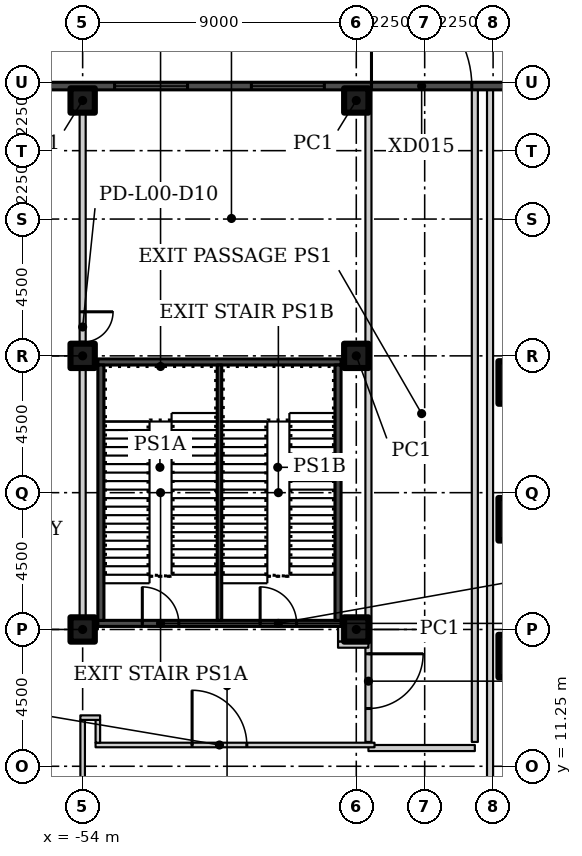
"""IFC4 building model, lengths in metres.
Left out: names, types, materials, properties, quantities, classifications, styles, units other than length and angle.
Written with IfcOpenShell. Run it as: python <this file> out.ifc"""

import sys

from ifc_helpers import new_model, si_unit, direction, frame, frame_2d, origin, origin_2d, place, context, subcontext, project, spatial, rectangle, hollow_rectangle, extrude, element, fill, save


model = new_model("IFC4")
c1 = context("Model", 3, precision=1e-05, world=origin(), true_north=direction((0.0, 1.0)))
c2 = subcontext(c1, "Body", "Model", "MODEL_VIEW")
j1 = project(units=[si_unit("LENGTHUNIT", "METRE"), si_unit("PLANEANGLEUNIT", "RADIAN")], contexts=[c1])
p1 = place(None, origin())
s1 = spatial("IfcSite", under=j1, at=p1, CompositionType="ELEMENT")
p2 = place(p1, origin())
s2 = spatial("IfcBuilding", under=s1, at=p2, CompositionType="ELEMENT")
p3 = place(p2, origin())
s3 = spatial("IfcBuildingStorey", under=s2, at=p3, CompositionType="ELEMENT", Elevation=0.0)
for number, where in (
    (1, (-39.625, 14.875, 0.0)),
    (2, (-39.625, 19.375, 0.0)),
    (3, (-39.625, 23.875, 0.0)),
):
    element("IfcColumn", number, at=place(p3, frame(where)), inside=s3, PredefinedType="COLUMN", context=c2, shape_type="SweptSolid", body=[
        extrude(hollow_rectangle(XDim=1.4, YDim=1.4, WallThickness=0.06, at=origin_2d()), origin(), (0.0, 0.0, 1.0), 6.1),
    ])
for number, where in (
    (4, (-54.0, 15.75, 0.0)),
    (5, (-54.0, 24.75, 0.0)),
    (6, (-54.0, 33.15, 0.0)),
    (7, (-45.0, 15.75, 0.0)),
    (8, (-45.0, 24.75, 0.0)),
    (9, (-45.0, 33.15, 0.0)),
):
    element("IfcColumn", number, at=place(p3, frame(where)), inside=s3, PredefinedType="COLUMN", context=c2, shape_type="SweptSolid", body=[
        extrude(hollow_rectangle(XDim=0.8, YDim=0.8, WallThickness=0.03, at=origin_2d()), origin(), (0.0, 0.0, 1.0), 6.1),
    ])
p4 = place(p3, frame((-40.6, 33.655, 0.0), z_axis=(0.0, 0.0, 1.0), x_axis=(0.0, -1.0, 0.0)))
e10 = element("IfcWall", 10, at=p4, inside=s3, PredefinedType="PARTITIONING", context=c2, shape_type="SweptSolid", body=[
    extrude(rectangle(XDim=26.905, YDim=0.2, at=frame_2d((13.453, 0.0))), origin(), (0.0, 0.0, 1.0), 6.1),
])
p5 = place(p3, frame((-44.6, 33.655, 0.0), z_axis=(0.0, 0.0, 1.0), x_axis=(0.0, -1.0, 0.0)))
e11 = element("IfcWall", 11, at=p5, inside=s3, PredefinedType="PARTITIONING", context=c2, shape_type="SweptSolid", body=[
    extrude(rectangle(XDim=21.605, YDim=0.2, at=frame_2d((10.802, 0.0))), origin(), (0.0, 0.0, 1.0), 6.1),
])
p6 = place(p5, frame((18.705, 0.0, 0.0)))
e12 = element("IfcOpeningElement", 12, at=p6, cuts=e11, PredefinedType="OPENING", context=c2, shape_type="SweptSolid", body=[
    extrude(rectangle(XDim=1.8, YDim=2.1, at=frame_2d((0.9, 1.05))), frame((0.0, 0.11, 0.0), z_axis=(0.0, -1.0, 0.0), x_axis=(1.0, 0.0, 0.0)), (0.0, 0.0, 1.0), 0.22),
])
p7 = place(p3, frame((-44.6, 11.85, 0.0)))
e13 = element("IfcWall", 13, at=p7, inside=s3, PredefinedType="PARTITIONING", context=c2, shape_type="SweptSolid", body=[
    extrude(rectangle(XDim=3.5, YDim=0.2, at=frame_2d((1.75, 0.0))), origin(), (0.0, 0.0, 1.0), 6.1),
])
p8 = place(p3, frame((-41.1, 12.05, 0.0), z_axis=(0.0, 0.0, 1.0), x_axis=(0.0, 1.0, 0.0)))
e14 = element("IfcWall", 14, at=p8, inside=s3, PredefinedType="PARTITIONING", context=c2, shape_type="SweptSolid", body=[
    extrude(rectangle(XDim=21.605, YDim=0.2, at=frame_2d((10.802, 0.0))), origin(), (0.0, 0.0, 1.0), 6.1),
])
p9 = place(p3, frame((-53.575, 11.95, 0.0)))
e15 = element("IfcWall", 15, at=p9, inside=s3, PredefinedType="PARTITIONING", context=c2, shape_type="SweptSolid", body=[
    extrude(rectangle(XDim=9.175, YDim=0.15, at=frame_2d((4.587, 0.0))), origin(), (0.0, 0.0, 1.0), 6.1),
])
p10 = place(p9, frame((3.175, 0.0, 0.0)))
e16 = element("IfcOpeningElement", 16, at=p10, cuts=e15, PredefinedType="OPENING", context=c2, shape_type="SweptSolid", body=[
    extrude(rectangle(XDim=1.8, YDim=2.4, at=frame_2d((0.9, 1.2))), frame((0.0, 0.085, 0.0), z_axis=(0.0, -1.0, 0.0), x_axis=(1.0, 0.0, 0.0)), (0.0, 0.0, 1.0), 0.17),
])
p11 = place(p3, frame((-54.0, 6.75, 0.0), z_axis=(0.0, 0.0, 1.0), x_axis=(0.0, 1.0, 0.0)))
e17 = element("IfcWall", 17, at=p11, inside=s3, PredefinedType="PARTITIONING", context=c2, shape_type="SweptSolid", body=[
    extrude(rectangle(XDim=6.025, YDim=0.15, at=frame_2d((3.012, 0.0))), origin(), (0.0, 0.0, 1.0), 6.1),
])
p12 = place(p3, frame((-54.0, 33.655, 0.0), z_axis=(0.0, 0.0, 1.0), x_axis=(0.0, -1.0, 0.0)))
e18 = element("IfcWall", 18, at=p12, inside=s3, PredefinedType="PARTITIONING", context=c2, shape_type="SweptSolid", body=[
    extrude(rectangle(XDim=17.705, YDim=0.2, at=frame_2d((8.853, 0.0))), origin(), (0.0, 0.0, 1.0), 6.1),
])
p13 = place(p12, frame((7.455, 0.0, 0.0)))
e19 = element("IfcOpeningElement", 19, at=p13, cuts=e18, PredefinedType="OPENING", context=c2, shape_type="SweptSolid", body=[
    extrude(rectangle(XDim=1.0, YDim=2.1, at=frame_2d((0.5, 1.05))), frame((0.0, 0.11, 0.0), z_axis=(0.0, -1.0, 0.0), x_axis=(1.0, 0.0, 0.0)), (0.0, 0.0, 1.0), 0.22),
])
p14 = place(p3, frame((-53.5, 12.775, 0.0), z_axis=(0.0, 0.0, 1.0), x_axis=(0.0, -1.0, 0.0)))
e20 = element("IfcWall", 20, at=p14, inside=s3, PredefinedType="PARTITIONING", context=c2, shape_type="SweptSolid", body=[
    extrude(rectangle(XDim=0.75, YDim=0.15, at=frame_2d((0.375, 0.0))), origin(), (0.0, 0.0, 1.0), 6.1),
])
p15 = place(p3, frame((-54.075, 12.85, 0.0)))
e21 = element("IfcWall", 21, at=p15, inside=s3, PredefinedType="PARTITIONING", context=c2, shape_type="SweptSolid", body=[
    extrude(rectangle(XDim=0.65, YDim=0.15, at=frame_2d((0.325, 0.0))), origin(), (0.0, 0.0, 1.0), 6.1),
])
p16 = place(p3, frame((-54.1, 15.85, 0.0)))
e22 = element("IfcWall", 22, at=p16, inside=s3, PredefinedType="PARTITIONING", context=c2, shape_type="SweptSolid", body=[
    extrude(rectangle(XDim=0.6, YDim=0.2, at=frame_2d((0.3, 0.0))), origin(), (0.0, 0.0, 1.0), 6.1),
])
p17 = place(p3, frame((-45.5, 15.85, 0.0), z_axis=(0.0, 0.0, 1.0), x_axis=(0.0, -1.0, 0.0)))
e23 = element("IfcWall", 23, at=p17, inside=s3, PredefinedType="PARTITIONING", context=c2, shape_type="SweptSolid", body=[
    extrude(rectangle(XDim=0.5, YDim=0.2, at=frame_2d((0.25, 0.0))), origin(), (0.0, 0.0, 1.0), 6.1),
])
p18 = place(p3, frame((-45.6, 15.25, 0.0)))
e24 = element("IfcWall", 24, at=p18, inside=s3, PredefinedType="PARTITIONING", context=c2, shape_type="SweptSolid", body=[
    extrude(rectangle(XDim=1.0, YDim=0.2, at=frame_2d((0.5, 0.0))), origin(), (0.0, 0.0, 1.0), 6.1),
])
p19 = place(p3, frame((-67.5, 33.625, 0.0)))
e25 = element("IfcWall", 25, at=p19, inside=s3, PredefinedType="SOLIDWALL", context=c2, shape_type="SweptSolid", body=[
    extrude(rectangle(XDim=130.5, YDim=0.25, at=frame_2d((65.25, 0.0))), origin(), (0.0, 0.0, 1.0), 6.15),
])
p20 = place(p19, frame((28.65, 0.0, 0.0)))
e26 = element("IfcOpeningElement", 26, at=p20, cuts=e25, PredefinedType="OPENING", context=c2, shape_type="SweptSolid", body=[
    extrude(rectangle(XDim=1.2, YDim=2.4, at=frame_2d((0.6, 1.2))), frame((0.0, 0.135, 0.0), z_axis=(0.0, -1.0, 0.0), x_axis=(1.0, 0.0, 0.0)), (0.0, 0.0, 1.0), 0.27),
])
p21 = place(p19, frame((37.25, 0.0, 0.0)))
e27 = element("IfcOpeningElement", 27, at=p21, cuts=e25, PredefinedType="OPENING", context=c2, shape_type="SweptSolid", body=[
    extrude(rectangle(XDim=2.0, YDim=2.4, at=frame_2d((1.0, 1.2))), frame((0.0, 0.135, 0.0), z_axis=(0.0, -1.0, 0.0), x_axis=(1.0, 0.0, 0.0)), (0.0, 0.0, 1.0), 0.27),
])
p22 = place(p19, frame((100.25, 0.0, 0.0)))
e28 = element("IfcOpeningElement", 28, at=p22, cuts=e25, PredefinedType="OPENING", context=c2, shape_type="SweptSolid", body=[
    extrude(rectangle(XDim=2.0, YDim=2.4, at=frame_2d((1.0, 1.2))), frame((0.0, 0.135, 0.0), z_axis=(0.0, -1.0, 0.0), x_axis=(1.0, 0.0, 0.0)), (0.0, 0.0, 1.0), 0.27),
])
p23 = place(p19, frame((55.25, 0.0, 0.0)))
e29 = element("IfcOpeningElement", 29, at=p23, cuts=e25, PredefinedType="OPENING", context=c2, shape_type="SweptSolid", body=[
    extrude(rectangle(XDim=2.0, YDim=2.4, at=frame_2d((1.0, 1.2))), frame((0.0, 0.135, 0.0), z_axis=(0.0, -1.0, 0.0), x_axis=(1.0, 0.0, 0.0)), (0.0, 0.0, 1.0), 0.27),
])
p24 = place(p19, frame((68.75, 0.0, 0.0)))
e30 = element("IfcOpeningElement", 30, at=p24, cuts=e25, PredefinedType="OPENING", context=c2, shape_type="SweptSolid", body=[
    extrude(rectangle(XDim=2.0, YDim=2.4, at=frame_2d((1.0, 1.2))), frame((0.0, 0.135, 0.0), z_axis=(0.0, -1.0, 0.0), x_axis=(1.0, 0.0, 0.0)), (0.0, 0.0, 1.0), 0.27),
])
p25 = place(p19, frame((10.25, 0.0, 0.0)))
e31 = element("IfcOpeningElement", 31, at=p25, cuts=e25, PredefinedType="OPENING", context=c2, shape_type="SweptSolid", body=[
    extrude(rectangle(XDim=2.0, YDim=2.4, at=frame_2d((1.0, 1.2))), frame((0.0, 0.135, 0.0), z_axis=(0.0, -1.0, 0.0), x_axis=(1.0, 0.0, 0.0)), (0.0, 0.0, 1.0), 0.27),
])
p26 = place(p19, frame((5.65, 0.0, 0.0)))
e32 = element("IfcOpeningElement", 32, at=p26, cuts=e25, PredefinedType="OPENING", context=c2, shape_type="SweptSolid", body=[
    extrude(rectangle(XDim=2.2, YDim=2.4, at=frame_2d((1.1, 1.2))), frame((0.0, 0.135, 0.0), z_axis=(0.0, -1.0, 0.0), x_axis=(1.0, 0.0, 0.0)), (0.0, 0.0, 1.0), 0.27),
])
p27 = place(p19, frame((113.65, 0.0, 0.0)))
e33 = element("IfcOpeningElement", 33, at=p27, cuts=e25, PredefinedType="OPENING", context=c2, shape_type="SweptSolid", body=[
    extrude(rectangle(XDim=2.2, YDim=2.4, at=frame_2d((1.1, 1.2))), frame((0.0, 0.135, 0.0), z_axis=(0.0, -1.0, 0.0), x_axis=(1.0, 0.0, 0.0)), (0.0, 0.0, 1.0), 0.27),
])
p28 = place(p19, frame((45.45, 0.0, 0.0)))
e34 = element("IfcOpeningElement", 34, at=p28, cuts=e25, PredefinedType="OPENING", context=c2, shape_type="SweptSolid", body=[
    extrude(rectangle(XDim=3.6, YDim=4.5, at=frame_2d((1.8, 2.25))), frame((0.0, 0.135, 0.0), z_axis=(0.0, -1.0, 0.0), x_axis=(1.0, 0.0, 0.0)), (0.0, 0.0, 1.0), 0.27),
])
p29 = place(p19, frame((91.15, 0.0, 0.0)))
e35 = element("IfcOpeningElement", 35, at=p29, cuts=e25, PredefinedType="OPENING", context=c2, shape_type="SweptSolid", body=[
    extrude(rectangle(XDim=2.2, YDim=2.4, at=frame_2d((1.1, 1.2))), frame((0.0, 0.135, 0.0), z_axis=(0.0, -1.0, 0.0), x_axis=(1.0, 0.0, 0.0)), (0.0, 0.0, 1.0), 0.27),
])
p30 = place(p19, frame((23.0, 0.0, 0.0)))
e36 = element("IfcOpeningElement", 36, at=p30, cuts=e25, PredefinedType="OPENING", context=c2, shape_type="SweptSolid", body=[
    extrude(rectangle(XDim=3.3, YDim=2.4, at=frame_2d((1.65, 1.2))), frame((0.0, 0.135, 0.0), z_axis=(0.0, -1.0, 0.0), x_axis=(1.0, 0.0, 0.0)), (0.0, 0.0, 1.0), 0.27),
])
p31 = place(p19, frame((59.0, 0.0, 0.0)))
e37 = element("IfcOpeningElement", 37, at=p31, cuts=e25, PredefinedType="OPENING", context=c2, shape_type="SweptSolid", body=[
    extrude(rectangle(XDim=3.3, YDim=2.4, at=frame_2d((1.65, 1.2))), frame((0.0, 0.135, 0.0), z_axis=(0.0, -1.0, 0.0), x_axis=(1.0, 0.0, 0.0)), (0.0, 0.0, 1.0), 0.27),
])
p32 = place(p19, frame((86.0, 0.0, 0.0)))
e38 = element("IfcOpeningElement", 38, at=p32, cuts=e25, PredefinedType="OPENING", context=c2, shape_type="SweptSolid", body=[
    extrude(rectangle(XDim=3.3, YDim=2.4, at=frame_2d((1.65, 1.2))), frame((0.0, 0.135, 0.0), z_axis=(0.0, -1.0, 0.0), x_axis=(1.0, 0.0, 0.0)), (0.0, 0.0, 1.0), 0.27),
])
p33 = place(p19, frame((122.0, 0.0, 0.0)))
e39 = element("IfcOpeningElement", 39, at=p33, cuts=e25, PredefinedType="OPENING", context=c2, shape_type="SweptSolid", body=[
    extrude(rectangle(XDim=3.3, YDim=2.4, at=frame_2d((1.65, 1.2))), frame((0.0, 0.135, 0.0), z_axis=(0.0, -1.0, 0.0), x_axis=(1.0, 0.0, 0.0)), (0.0, 0.0, 1.0), 0.27),
])
p34 = place(p19, frame((127.05, 0.0, 3.0)))
e40 = element("IfcOpeningElement", 40, at=p34, cuts=e25, PredefinedType="OPENING", context=c2, shape_type="SweptSolid", body=[
    extrude(rectangle(XDim=2.4, YDim=1.2, at=frame_2d((1.2, 0.6))), frame((0.0, 0.135, 0.0), z_axis=(0.0, -1.0, 0.0), x_axis=(1.0, 0.0, 0.0)), (0.0, 0.0, 1.0), 0.27),
])
p35 = place(p19, frame((118.05, 0.0, 3.0)))
e41 = element("IfcOpeningElement", 41, at=p35, cuts=e25, PredefinedType="OPENING", context=c2, shape_type="SweptSolid", body=[
    extrude(rectangle(XDim=2.4, YDim=1.2, at=frame_2d((1.2, 0.6))), frame((0.0, 0.135, 0.0), z_axis=(0.0, -1.0, 0.0), x_axis=(1.0, 0.0, 0.0)), (0.0, 0.0, 1.0), 0.27),
])
p36 = place(p19, frame((109.05, 0.0, 3.0)))
e42 = element("IfcOpeningElement", 42, at=p36, cuts=e25, PredefinedType="OPENING", context=c2, shape_type="SweptSolid", body=[
    extrude(rectangle(XDim=2.4, YDim=1.2, at=frame_2d((1.2, 0.6))), frame((0.0, 0.135, 0.0), z_axis=(0.0, -1.0, 0.0), x_axis=(1.0, 0.0, 0.0)), (0.0, 0.0, 1.0), 0.27),
])
p37 = place(p19, frame((104.55, 0.0, 3.0)))
e43 = element("IfcOpeningElement", 43, at=p37, cuts=e25, PredefinedType="OPENING", context=c2, shape_type="SweptSolid", body=[
    extrude(rectangle(XDim=2.4, YDim=1.2, at=frame_2d((1.2, 0.6))), frame((0.0, 0.135, 0.0), z_axis=(0.0, -1.0, 0.0), x_axis=(1.0, 0.0, 0.0)), (0.0, 0.0, 1.0), 0.27),
])
p38 = place(p19, frame((95.55, 0.0, 3.0)))
e44 = element("IfcOpeningElement", 44, at=p38, cuts=e25, PredefinedType="OPENING", context=c2, shape_type="SweptSolid", body=[
    extrude(rectangle(XDim=2.4, YDim=1.2, at=frame_2d((1.2, 0.6))), frame((0.0, 0.135, 0.0), z_axis=(0.0, -1.0, 0.0), x_axis=(1.0, 0.0, 0.0)), (0.0, 0.0, 1.0), 0.27),
])
p39 = place(p19, frame((82.05, 0.0, 3.0)))
e45 = element("IfcOpeningElement", 45, at=p39, cuts=e25, PredefinedType="OPENING", context=c2, shape_type="SweptSolid", body=[
    extrude(rectangle(XDim=2.4, YDim=1.2, at=frame_2d((1.2, 0.6))), frame((0.0, 0.135, 0.0), z_axis=(0.0, -1.0, 0.0), x_axis=(1.0, 0.0, 0.0)), (0.0, 0.0, 1.0), 0.27),
])
p40 = place(p19, frame((77.55, 0.0, 3.0)))
e46 = element("IfcOpeningElement", 46, at=p40, cuts=e25, PredefinedType="OPENING", context=c2, shape_type="SweptSolid", body=[
    extrude(rectangle(XDim=2.4, YDim=1.2, at=frame_2d((1.2, 0.6))), frame((0.0, 0.135, 0.0), z_axis=(0.0, -1.0, 0.0), x_axis=(1.0, 0.0, 0.0)), (0.0, 0.0, 1.0), 0.27),
])
p41 = place(p19, frame((73.05, 0.0, 3.0)))
e47 = element("IfcOpeningElement", 47, at=p41, cuts=e25, PredefinedType="OPENING", context=c2, shape_type="SweptSolid", body=[
    extrude(rectangle(XDim=2.4, YDim=1.2, at=frame_2d((1.2, 0.6))), frame((0.0, 0.135, 0.0), z_axis=(0.0, -1.0, 0.0), x_axis=(1.0, 0.0, 0.0)), (0.0, 0.0, 1.0), 0.27),
])
p42 = place(p19, frame((64.05, 0.0, 3.0)))
e48 = element("IfcOpeningElement", 48, at=p42, cuts=e25, PredefinedType="OPENING", context=c2, shape_type="SweptSolid", body=[
    extrude(rectangle(XDim=2.4, YDim=1.2, at=frame_2d((1.2, 0.6))), frame((0.0, 0.135, 0.0), z_axis=(0.0, -1.0, 0.0), x_axis=(1.0, 0.0, 0.0)), (0.0, 0.0, 1.0), 0.27),
])
p43 = place(p19, frame((50.55, 0.0, 3.0)))
e49 = element("IfcOpeningElement", 49, at=p43, cuts=e25, PredefinedType="OPENING", context=c2, shape_type="SweptSolid", body=[
    extrude(rectangle(XDim=2.4, YDim=1.2, at=frame_2d((1.2, 0.6))), frame((0.0, 0.135, 0.0), z_axis=(0.0, -1.0, 0.0), x_axis=(1.0, 0.0, 0.0)), (0.0, 0.0, 1.0), 0.27),
])
p44 = place(p19, frame((41.55, 0.0, 3.0)))
e50 = element("IfcOpeningElement", 50, at=p44, cuts=e25, PredefinedType="OPENING", context=c2, shape_type="SweptSolid", body=[
    extrude(rectangle(XDim=2.4, YDim=1.2, at=frame_2d((1.2, 0.6))), frame((0.0, 0.135, 0.0), z_axis=(0.0, -1.0, 0.0), x_axis=(1.0, 0.0, 0.0)), (0.0, 0.0, 1.0), 0.27),
])
p45 = place(p19, frame((32.55, 0.0, 3.0)))
e51 = element("IfcOpeningElement", 51, at=p45, cuts=e25, PredefinedType="OPENING", context=c2, shape_type="SweptSolid", body=[
    extrude(rectangle(XDim=2.4, YDim=1.2, at=frame_2d((1.2, 0.6))), frame((0.0, 0.135, 0.0), z_axis=(0.0, -1.0, 0.0), x_axis=(1.0, 0.0, 0.0)), (0.0, 0.0, 1.0), 0.27),
])
p46 = place(p19, frame((19.05, 0.0, 3.0)))
e52 = element("IfcOpeningElement", 52, at=p46, cuts=e25, PredefinedType="OPENING", context=c2, shape_type="SweptSolid", body=[
    extrude(rectangle(XDim=2.4, YDim=1.2, at=frame_2d((1.2, 0.6))), frame((0.0, 0.135, 0.0), z_axis=(0.0, -1.0, 0.0), x_axis=(1.0, 0.0, 0.0)), (0.0, 0.0, 1.0), 0.27),
])
p47 = place(p19, frame((14.55, 0.0, 3.0)))
e53 = element("IfcOpeningElement", 53, at=p47, cuts=e25, PredefinedType="OPENING", context=c2, shape_type="SweptSolid", body=[
    extrude(rectangle(XDim=2.4, YDim=1.2, at=frame_2d((1.2, 0.6))), frame((0.0, 0.135, 0.0), z_axis=(0.0, -1.0, 0.0), x_axis=(1.0, 0.0, 0.0)), (0.0, 0.0, 1.0), 0.27),
])
p48 = place(p19, frame((1.05, 0.0, 3.0)))
e54 = element("IfcOpeningElement", 54, at=p48, cuts=e25, PredefinedType="OPENING", context=c2, shape_type="SweptSolid", body=[
    extrude(rectangle(XDim=2.4, YDim=1.2, at=frame_2d((1.2, 0.6))), frame((0.0, 0.135, 0.0), z_axis=(0.0, -1.0, 0.0), x_axis=(1.0, 0.0, 0.0)), (0.0, 0.0, 1.0), 0.27),
])
p49 = place(p3, frame((-53.5, 15.95, 0.0)))
e55 = element("IfcWall", 55, at=p49, inside=s3, PredefinedType="SHEAR", context=c2, shape_type="SweptSolid", body=[
    extrude(rectangle(XDim=8.0, YDim=0.2, at=frame_2d((4.0, 0.0))), origin(), (0.0, 0.0, 1.0), 6.1),
])
p50 = place(p49, frame((1.462, 0.0, 0.0)))
e56 = element("IfcOpeningElement", 56, at=p50, cuts=e55, PredefinedType="OPENING", context=c2, shape_type="SweptSolid", body=[
    extrude(rectangle(XDim=1.2, YDim=2.4, at=frame_2d((0.6, 1.2))), frame((0.0, 0.11, 0.0), z_axis=(0.0, -1.0, 0.0), x_axis=(1.0, 0.0, 0.0)), (0.0, 0.0, 1.0), 0.22),
])
p51 = place(p49, frame((5.337, 0.0, 0.0)))
e57 = element("IfcOpeningElement", 57, at=p51, cuts=e55, PredefinedType="OPENING", context=c2, shape_type="SweptSolid", body=[
    extrude(rectangle(XDim=1.2, YDim=2.4, at=frame_2d((0.6, 1.2))), frame((0.0, 0.11, 0.0), z_axis=(0.0, -1.0, 0.0), x_axis=(1.0, 0.0, 0.0)), (0.0, 0.0, 1.0), 0.22),
])
p52 = place(p3, frame((-53.5, 24.55, 0.0)))
e58 = element("IfcWall", 58, at=p52, inside=s3, PredefinedType="SHEAR", context=c2, shape_type="SweptSolid", body=[
    extrude(rectangle(XDim=8.0, YDim=0.2, at=frame_2d((4.0, 0.0))), origin(), (0.0, 0.0, 1.0), 6.1),
])
for number, where, z_axis, x_axis in (
    (59, (-53.4, 16.05, 0.0), (0.0, 0.0, 1.0), (0.0, 1.0, 0.0)),
    (60, (-45.6, 16.05, 0.0), (0.0, 0.0, 1.0), (0.0, 1.0, 0.0)),
):
    element("IfcWall", number, at=place(p3, frame(where, z_axis=z_axis, x_axis=x_axis)), inside=s3, PredefinedType="SHEAR", context=c2, shape_type="SweptSolid", body=[
        extrude(rectangle(XDim=8.4, YDim=0.2, at=frame_2d((4.2, 0.0))), origin(), (0.0, 0.0, 1.0), 6.1),
    ])
p53 = place(p3, frame((-49.5, 16.05, 0.0), z_axis=(0.0, 0.0, 1.0), x_axis=(0.0, 1.0, 0.0)))
e61 = element("IfcWall", 61, at=p53, inside=s3, PredefinedType="SHEAR", context=c2, shape_type="SweptSolid", body=[
    extrude(rectangle(XDim=8.4, YDim=0.15, at=frame_2d((4.2, 0.0))), origin(), (0.0, 0.0, 1.0), 6.1),
])
p54 = place(p13, origin())
e62 = element("IfcDoor", 62, at=p54, inside=s3, OperationType="SINGLE_SWING_LEFT", PredefinedType="DOOR", context=c2, shape_type="SweptSolid", body=[
    extrude(rectangle(XDim=1.0, YDim=2.1, at=frame_2d((0.5, 1.05))), frame((0.0, 0.025, 0.0), z_axis=(0.0, -1.0, 0.0), x_axis=(1.0, 0.0, 0.0)), (0.0, 0.0, 1.0), 0.05),
])
fill(e19, e62)
p55 = place(p10, origin())
e63 = element("IfcDoor", 63, at=p55, inside=s3, OperationType="DOUBLE_DOOR_SINGLE_SWING", PredefinedType="DOOR", context=c2, shape_type="SweptSolid", body=[
    extrude(rectangle(XDim=1.8, YDim=2.4, at=frame_2d((0.9, 1.2))), frame((0.0, 0.025, 0.0), z_axis=(0.0, -1.0, 0.0), x_axis=(1.0, 0.0, 0.0)), (0.0, 0.0, 1.0), 0.05),
])
fill(e16, e63)
p56 = place(p6, origin())
e64 = element("IfcDoor", 64, at=p56, inside=s3, OperationType="DOUBLE_DOOR_SINGLE_SWING", PredefinedType="DOOR", context=c2, shape_type="SweptSolid", body=[
    extrude(rectangle(XDim=1.8, YDim=2.1, at=frame_2d((0.9, 1.05))), frame((0.0, 0.025, 0.0), z_axis=(0.0, -1.0, 0.0), x_axis=(1.0, 0.0, 0.0)), (0.0, 0.0, 1.0), 0.05),
])
fill(e12, e64)
p57 = place(p30, origin())
e65 = element("IfcDoor", 65, at=p57, inside=s3, OperationType="DOUBLE_DOOR_SINGLE_SWING", PredefinedType="DOOR", context=c2, shape_type="SweptSolid", body=[
    extrude(rectangle(XDim=3.3, YDim=2.4, at=frame_2d((1.65, 1.2))), frame((0.0, 0.025, 0.0), z_axis=(0.0, -1.0, 0.0), x_axis=(1.0, 0.0, 0.0)), (0.0, 0.0, 1.0), 0.05),
])
fill(e36, e65)
p58 = place(p46, origin())
e66 = element("IfcWindow", 66, at=p58, inside=s3, PartitioningType="DOUBLE_PANEL_HORIZONTAL", PredefinedType="WINDOW", context=c2, shape_type="SweptSolid", body=[
    extrude(rectangle(XDim=2.4, YDim=1.2, at=frame_2d((1.2, 0.6))), frame((0.0, 0.03, 0.0), z_axis=(0.0, -1.0, 0.0), x_axis=(1.0, 0.0, 0.0)), (0.0, 0.0, 1.0), 0.06),
])
fill(e52, e66)
p59 = place(p47, origin())
e67 = element("IfcWindow", 67, at=p59, inside=s3, PartitioningType="DOUBLE_PANEL_HORIZONTAL", PredefinedType="WINDOW", context=c2, shape_type="SweptSolid", body=[
    extrude(rectangle(XDim=2.4, YDim=1.2, at=frame_2d((1.2, 0.6))), frame((0.0, 0.03, 0.0), z_axis=(0.0, -1.0, 0.0), x_axis=(1.0, 0.0, 0.0)), (0.0, 0.0, 1.0), 0.06),
])
fill(e53, e67)
p60 = place(p50, origin())
e68 = element("IfcDoor", 68, at=p60, inside=s3, OperationType="SINGLE_SWING_LEFT", PredefinedType="DOOR", context=c2, shape_type="SweptSolid", body=[
    extrude(rectangle(XDim=1.2, YDim=2.4, at=frame_2d((0.6, 1.2))), frame((0.0, 0.025, 0.0), z_axis=(0.0, -1.0, 0.0), x_axis=(1.0, 0.0, 0.0)), (0.0, 0.0, 1.0), 0.05),
])
fill(e56, e68)
p61 = place(p51, origin())
e69 = element("IfcDoor", 69, at=p61, inside=s3, OperationType="SINGLE_SWING_RIGHT", PredefinedType="DOOR", context=c2, shape_type="SweptSolid", body=[
    extrude(rectangle(XDim=1.2, YDim=2.4, at=frame_2d((0.6, 1.2))), frame((0.0, 0.025, 0.0), z_axis=(0.0, -1.0, 0.0), x_axis=(1.0, 0.0, 0.0)), (0.0, 0.0, 1.0), 0.05),
])
fill(e57, e69)
save(model, sys.argv[1])
